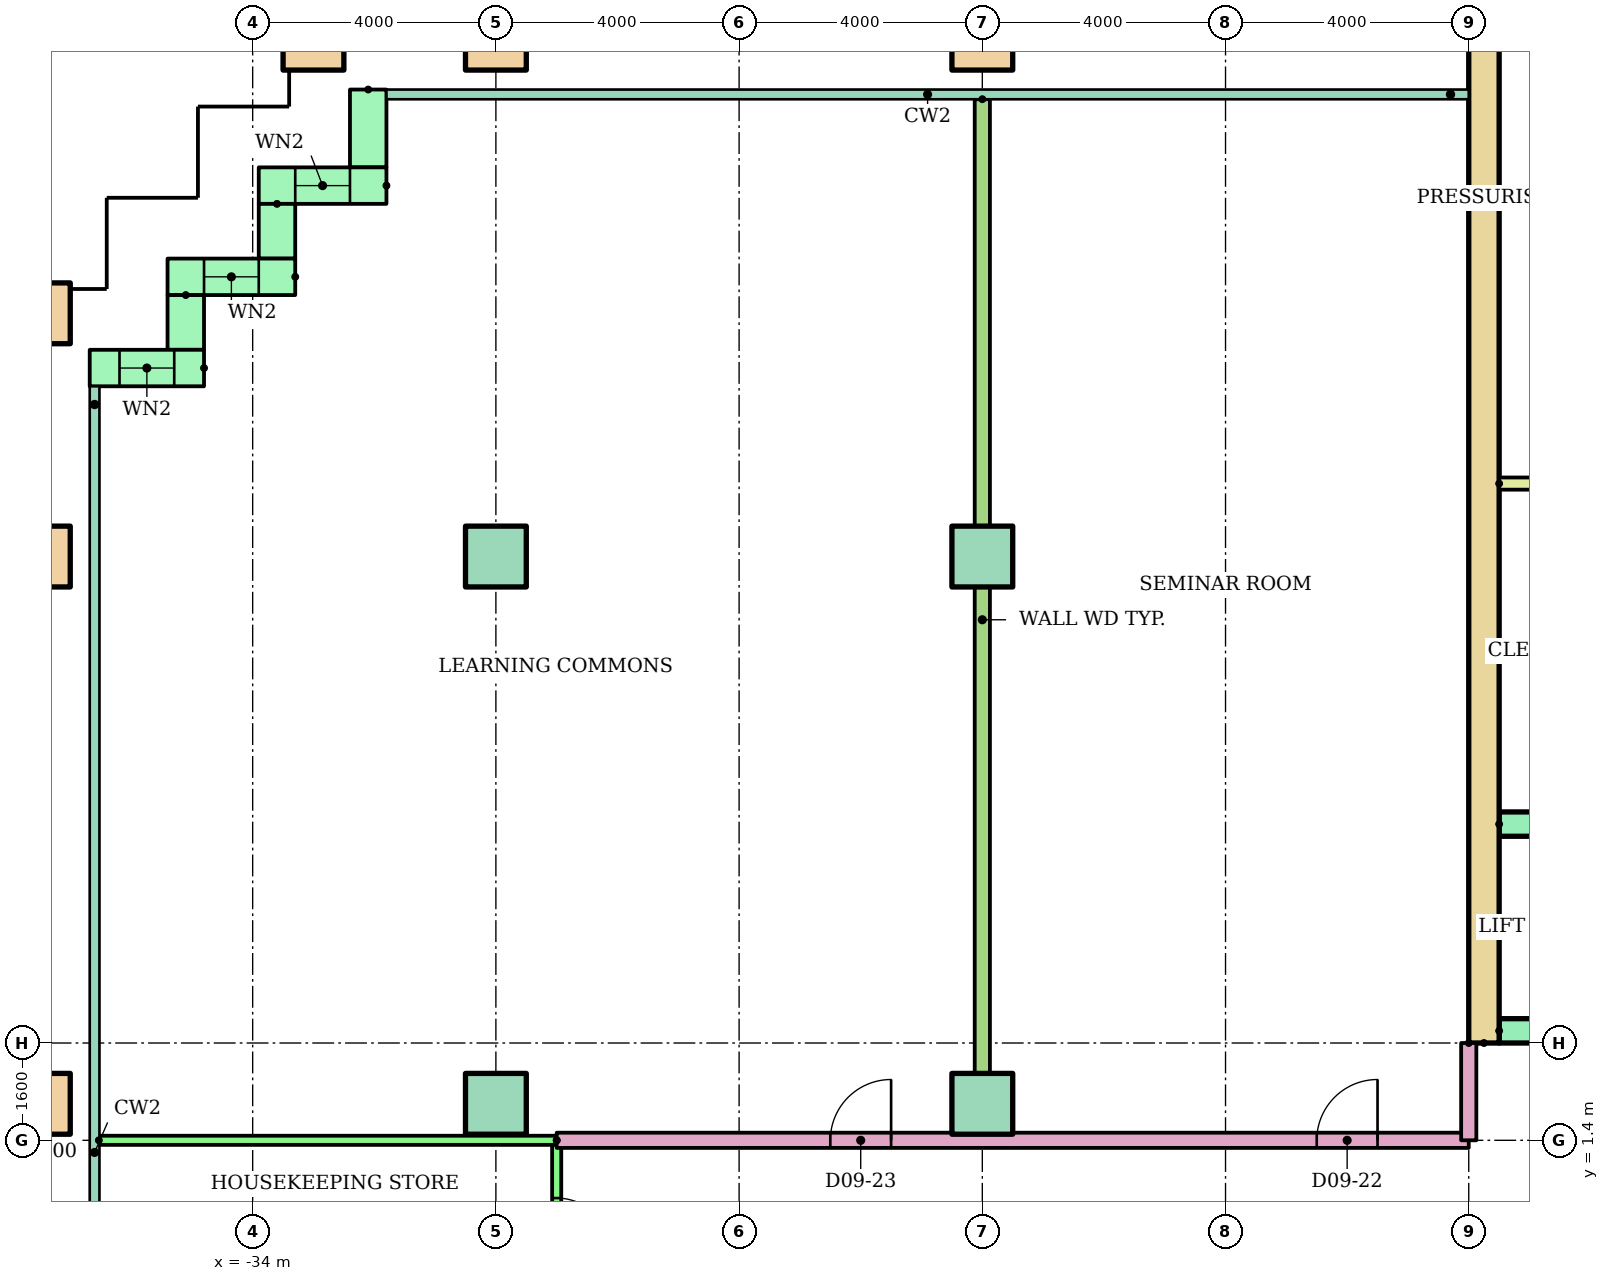
"""IFC4 building model, lengths in metres.
Left out: names, types, materials, properties, quantities, classifications, styles, units other than length and angle.
Written with IfcOpenShell. Run it as: python <this file> out.ifc"""

import sys

from ifc_helpers import new_model, si_unit, direction, frame, frame_2d, origin, origin_2d, place, context, subcontext, project, spatial, rectangle, hollow_rectangle, extrude, element, fill, save


model = new_model("IFC4")
c1 = context("Model", 3, precision=1e-05, world=origin(), true_north=direction((0.0, 1.0)))
c2 = subcontext(c1, "Body", "Model", "MODEL_VIEW")
j1 = project(units=[si_unit("LENGTHUNIT", "METRE"), si_unit("PLANEANGLEUNIT", "RADIAN")], contexts=[c1])
p1 = place(None, origin())
s1 = spatial("IfcSite", under=j1, at=p1, CompositionType="ELEMENT")
p2 = place(p1, origin())
s2 = spatial("IfcBuilding", under=s1, at=p2, CompositionType="ELEMENT")
p3 = place(p2, frame((0.0, 0.0, 37.7)))
s3 = spatial("IfcBuildingStorey", under=s2, at=p3, CompositionType="ELEMENT", Elevation=37.7)
p4 = place(p3, frame((-37.5, 2.0, 0.0)))
e1 = element("IfcColumn", 1, at=p4, inside=s3, PredefinedType="COLUMN", context=c2, shape_type="SweptSolid", body=[
    extrude(hollow_rectangle(XDim=1.0, YDim=1.0, WallThickness=0.05, at=origin_2d()), origin(), (0.0, 0.0, 1.0), 3.9),
])
for number, where in (
    (2, (-30.0, 2.0, 0.0)),
    (3, (-22.0, 2.0, 0.0)),
):
    element("IfcColumn", number, at=place(p3, frame(where)), inside=s3, PredefinedType="COLUMN", context=c2, shape_type="SweptSolid", body=[
        extrude(rectangle(XDim=1.0, YDim=1.0, at=origin_2d()), origin(), (0.0, 0.0, 1.0), 3.9),
    ])
p5 = place(p3, frame((-37.5, 11.0, 0.0)))
e4 = element("IfcColumn", 4, at=p5, inside=s3, PredefinedType="COLUMN", context=c2, shape_type="SweptSolid", body=[
    extrude(hollow_rectangle(XDim=1.0, YDim=1.0, WallThickness=0.05, at=origin_2d()), origin(), (0.0, 0.0, 1.0), 3.9),
])
for number, where in (
    (5, (-30.0, 11.0, 0.0)),
    (6, (-22.0, 11.0, 0.0)),
):
    element("IfcColumn", number, at=place(p3, frame(where)), inside=s3, PredefinedType="COLUMN", context=c2, shape_type="SweptSolid", body=[
        extrude(rectangle(XDim=1.0, YDim=1.0, at=origin_2d()), origin(), (0.0, 0.0, 1.0), 3.9),
    ])
for number, where in (
    (7, (-37.5, 15.0, 0.0)),
    (8, (-33.0, 19.5, 0.0)),
    (9, (-30.0, 19.5, 0.0)),
    (10, (-22.0, 19.5, 0.0)),
):
    element("IfcColumn", number, at=place(p3, frame(where)), inside=s3, PredefinedType="COLUMN", context=c2, shape_type="SweptSolid", body=[
        extrude(hollow_rectangle(XDim=1.0, YDim=1.0, WallThickness=0.05, at=origin_2d()), origin(), (0.0, 0.0, 1.0), 3.9),
    ])
p6 = place(p3, frame((-32.1, 18.68, 0.0), z_axis=(0.0, 0.0, 1.0), x_axis=(0.0, -1.0, 0.0)))
e11 = element("IfcWall", 11, at=p6, inside=s3, PredefinedType="STANDARD", context=c2, shape_type="SweptSolid", body=[
    extrude(rectangle(XDim=1.28, YDim=0.6, at=frame_2d((0.64, 0.0))), origin(), (0.0, 0.0, 1.0), 3.62),
])
p7 = place(p3, frame((-31.8, 17.1, 0.0), z_axis=(0.0, 0.0, 1.0), x_axis=(-1.0, 0.0, 0.0)))
e12 = element("IfcWall", 12, at=p7, inside=s3, PredefinedType="STANDARD", context=c2, shape_type="SweptSolid", body=[
    extrude(rectangle(XDim=2.1, YDim=0.6, at=frame_2d((1.05, 0.0))), origin(), (0.0, 0.0, 1.0), 3.62),
])
p8 = place(p7, frame((0.6, 0.0, 0.9)))
e13 = element("IfcOpeningElement", 13, at=p8, cuts=e12, PredefinedType="OPENING", context=c2, shape_type="SweptSolid", body=[
    extrude(rectangle(XDim=0.9, YDim=1.8, at=frame_2d((0.45, 0.9))), frame((0.0, 0.31, 0.0), z_axis=(0.0, -1.0, 0.0), x_axis=(1.0, 0.0, 0.0)), (0.0, 0.0, 1.0), 0.62),
])
p9 = place(p3, frame((-33.6, 16.8, 0.0), z_axis=(0.0, 0.0, 1.0), x_axis=(0.0, -1.0, 0.0)))
e14 = element("IfcWall", 14, at=p9, inside=s3, PredefinedType="STANDARD", context=c2, shape_type="SweptSolid", body=[
    extrude(rectangle(XDim=0.9, YDim=0.6, at=frame_2d((0.45, 0.0))), origin(), (0.0, 0.0, 1.0), 3.62),
])
p10 = place(p3, frame((-33.3, 15.6, 0.0), z_axis=(0.0, 0.0, 1.0), x_axis=(-1.0, 0.0, 0.0)))
e15 = element("IfcWall", 15, at=p10, inside=s3, PredefinedType="STANDARD", context=c2, shape_type="SweptSolid", body=[
    extrude(rectangle(XDim=2.1, YDim=0.6, at=frame_2d((1.05, 0.0))), origin(), (0.0, 0.0, 1.0), 3.62),
])
p11 = place(p10, frame((0.6, 0.0, 0.9)))
e16 = element("IfcOpeningElement", 16, at=p11, cuts=e15, PredefinedType="OPENING", context=c2, shape_type="SweptSolid", body=[
    extrude(rectangle(XDim=0.9, YDim=1.8, at=frame_2d((0.45, 0.9))), frame((0.0, 0.31, 0.0), z_axis=(0.0, -1.0, 0.0), x_axis=(1.0, 0.0, 0.0)), (0.0, 0.0, 1.0), 0.62),
])
p12 = place(p3, frame((-35.1, 15.3, 0.0), z_axis=(0.0, 0.0, 1.0), x_axis=(0.0, -1.0, 0.0)))
e17 = element("IfcWall", 17, at=p12, inside=s3, PredefinedType="STANDARD", context=c2, shape_type="SweptSolid", body=[
    extrude(rectangle(XDim=0.9, YDim=0.6, at=frame_2d((0.45, 0.0))), origin(), (0.0, 0.0, 1.0), 3.62),
])
p13 = place(p3, frame((-34.8, 14.1, 0.0), z_axis=(0.0, 0.0, 1.0), x_axis=(-1.0, 0.0, 0.0)))
e18 = element("IfcWall", 18, at=p13, inside=s3, PredefinedType="STANDARD", context=c2, shape_type="SweptSolid", body=[
    extrude(rectangle(XDim=1.88, YDim=0.6, at=frame_2d((0.94, 0.0))), origin(), (0.0, 0.0, 1.0), 3.62),
])
p14 = place(p13, frame((0.49, 0.0, 0.9)))
e19 = element("IfcOpeningElement", 19, at=p14, cuts=e18, PredefinedType="OPENING", context=c2, shape_type="SweptSolid", body=[
    extrude(rectangle(XDim=0.9, YDim=1.8, at=frame_2d((0.45, 0.9))), frame((0.0, 0.31, 0.0), z_axis=(0.0, -1.0, 0.0), x_axis=(1.0, 0.0, 0.0)), (0.0, 0.0, 1.0), 0.62),
])
p15 = place(p3, frame((-13.75, 3.0, 0.0), z_axis=(0.0, 0.0, 1.0), x_axis=(0.0, 1.0, 0.0)))
e20 = element("IfcWall", 20, at=p15, inside=s3, PredefinedType="SHEAR", context=c2, shape_type="SweptSolid", body=[
    extrude(rectangle(XDim=17.0, YDim=0.5, at=frame_2d((8.5, 0.0))), origin(), (0.0, 0.0, 1.0), 3.62),
])
p16 = place(p3, frame((-13.5, 3.2, 0.0)))
e21 = element("IfcWall", 21, at=p16, inside=s3, PredefinedType="SHEAR", context=c2, shape_type="SweptSolid", body=[
    extrude(rectangle(XDim=27.0, YDim=0.4, at=frame_2d((13.5, 0.0))), origin(), (0.0, 0.0, 1.0), 3.62),
])
p17 = place(p16, frame((6.861, 0.0, 0.0)))
e22 = element("IfcOpeningElement", 22, at=p17, cuts=e21, PredefinedType="OPENING", context=c2, shape_type="SweptSolid", body=[
    extrude(rectangle(XDim=1.1, YDim=2.1, at=frame_2d((0.55, 1.05))), frame((0.0, 0.21, 0.0), z_axis=(0.0, -1.0, 0.0), x_axis=(1.0, 0.0, 0.0)), (0.0, 0.0, 1.0), 0.42),
])
p18 = place(p16, frame((9.906, 0.0, 0.0)))
e23 = element("IfcOpeningElement", 23, at=p18, cuts=e21, PredefinedType="OPENING", context=c2, shape_type="SweptSolid", body=[
    extrude(rectangle(XDim=1.1, YDim=2.1, at=frame_2d((0.55, 1.05))), frame((0.0, 0.21, 0.0), z_axis=(0.0, -1.0, 0.0), x_axis=(1.0, 0.0, 0.0)), (0.0, 0.0, 1.0), 0.42),
])
p19 = place(p16, frame((15.994, 0.0, 0.0)))
e24 = element("IfcOpeningElement", 24, at=p19, cuts=e21, PredefinedType="OPENING", context=c2, shape_type="SweptSolid", body=[
    extrude(rectangle(XDim=1.1, YDim=2.1, at=frame_2d((0.55, 1.05))), frame((0.0, 0.21, 0.0), z_axis=(0.0, -1.0, 0.0), x_axis=(1.0, 0.0, 0.0)), (0.0, 0.0, 1.0), 0.42),
])
p20 = place(p16, frame((19.039, 0.0, 0.0)))
e25 = element("IfcOpeningElement", 25, at=p20, cuts=e21, PredefinedType="OPENING", context=c2, shape_type="SweptSolid", body=[
    extrude(rectangle(XDim=1.1, YDim=2.1, at=frame_2d((0.55, 1.05))), frame((0.0, 0.21, 0.0), z_axis=(0.0, -1.0, 0.0), x_axis=(1.0, 0.0, 0.0)), (0.0, 0.0, 1.0), 0.42),
])
p21 = place(p16, frame((12.6, 0.0, 0.0)))
e26 = element("IfcOpeningElement", 26, at=p21, cuts=e21, PredefinedType="OPENING", context=c2, shape_type="SweptSolid", body=[
    extrude(rectangle(XDim=1.8, YDim=2.1, at=frame_2d((0.9, 1.05))), frame((0.0, 0.21, 0.0), z_axis=(0.0, -1.0, 0.0), x_axis=(1.0, 0.0, 0.0)), (0.0, 0.0, 1.0), 0.42),
])
p22 = place(p3, frame((-13.5, 6.6, 0.0)))
e27 = element("IfcWall", 27, at=p22, inside=s3, PredefinedType="SHEAR", context=c2, shape_type="SweptSolid", body=[
    extrude(rectangle(XDim=11.978, YDim=0.4, at=frame_2d((5.989, 0.0))), origin(), (0.0, 0.0, 1.0), 3.62),
])
p23 = place(p3, frame((-13.5, 12.2, 0.0)))
e28 = element("IfcWall", 28, at=p23, inside=s3, PredefinedType="PARTITIONING", context=c2, shape_type="SweptSolid", body=[
    extrude(rectangle(XDim=3.9, YDim=0.2, at=frame_2d((1.95, 0.0))), origin(), (0.0, 0.0, 1.0), 3.62),
])
p24 = place(p3, frame((-29.0, 1.4, 0.0), z_axis=(0.0, 0.0, 1.0), x_axis=(0.0, -1.0, 0.0)))
e29 = element("IfcWall", 29, at=p24, inside=s3, PredefinedType="PARTITIONING", context=c2, shape_type="SweptSolid", body=[
    extrude(rectangle(XDim=2.8, YDim=0.15, at=frame_2d((1.4, 0.0))), origin(), (0.0, 0.0, 1.0), 3.1),
])
p25 = place(p24, frame((0.95, 0.0, 0.0)))
e30 = element("IfcOpeningElement", 30, at=p25, cuts=e29, PredefinedType="OPENING", context=c2, shape_type="SweptSolid", body=[
    extrude(rectangle(XDim=0.9, YDim=2.1, at=frame_2d((0.45, 1.05))), frame((0.0, 0.085, 0.0), z_axis=(0.0, -1.0, 0.0), x_axis=(1.0, 0.0, 0.0)), (0.0, 0.0, 1.0), 0.17),
])
p26 = place(p3, frame((-29.0, 1.4, 0.0)))
e31 = element("IfcWall", 31, at=p26, inside=s3, PredefinedType="PARTITIONING", context=c2, shape_type="SweptSolid", body=[
    extrude(rectangle(XDim=15.0, YDim=0.25, at=frame_2d((7.5, 0.0))), origin(), (0.0, 0.0, 1.0), 3.1),
])
p27 = place(p26, frame((12.5, 0.0, 0.0)))
e32 = element("IfcOpeningElement", 32, at=p27, cuts=e31, PredefinedType="OPENING", context=c2, shape_type="SweptSolid", body=[
    extrude(rectangle(XDim=1.0, YDim=2.1, at=frame_2d((0.5, 1.05))), frame((0.0, 0.135, 0.0), z_axis=(0.0, -1.0, 0.0), x_axis=(1.0, 0.0, 0.0)), (0.0, 0.0, 1.0), 0.27),
])
p28 = place(p26, frame((4.5, 0.0, 0.0)))
e33 = element("IfcOpeningElement", 33, at=p28, cuts=e31, PredefinedType="OPENING", context=c2, shape_type="SweptSolid", body=[
    extrude(rectangle(XDim=1.0, YDim=2.1, at=frame_2d((0.5, 1.05))), frame((0.0, 0.135, 0.0), z_axis=(0.0, -1.0, 0.0), x_axis=(1.0, 0.0, 0.0)), (0.0, 0.0, 1.0), 0.27),
])
p29 = place(p3, frame((-36.53, 1.4, 0.0)))
e34 = element("IfcWall", 34, at=p29, inside=s3, PredefinedType="PARTITIONING", context=c2, shape_type="SweptSolid", body=[
    extrude(rectangle(XDim=7.53, YDim=0.15, at=frame_2d((3.765, 0.0))), origin(), (0.0, 0.0, 1.0), 3.1),
])
p30 = place(p3, frame((-22.0, 18.521, 0.0), z_axis=(0.0, 0.0, 1.0), x_axis=(0.0, -1.0, 0.0)))
e35 = element("IfcWall", 35, at=p30, inside=s3, PredefinedType="PARTITIONING", context=c2, shape_type="SweptSolid", body=[
    extrude(rectangle(XDim=17.121, YDim=0.25, at=frame_2d((8.561, 0.0))), origin(), (0.0, 0.0, 1.0), 3.1),
])
p31 = place(p3, frame((-14.0, 3.0, 0.0), z_axis=(0.0, 0.0, 1.0), x_axis=(0.0, -1.0, 0.0)))
e36 = element("IfcWall", 36, at=p31, inside=s3, PredefinedType="PARTITIONING", context=c2, shape_type="SweptSolid", body=[
    extrude(rectangle(XDim=1.6, YDim=0.25, at=frame_2d((0.8, 0.0))), origin(), (0.0, 0.0, 1.0), 3.1),
])
p32 = place(p8, origin())
e37 = element("IfcWindow", 37, at=p32, inside=s3, PartitioningType="SINGLE_PANEL", PredefinedType="WINDOW", context=c2, shape_type="SweptSolid", body=[
    extrude(rectangle(XDim=0.9, YDim=1.8, at=frame_2d((0.45, 0.9))), frame((0.0, 0.03, 0.0), z_axis=(0.0, -1.0, 0.0), x_axis=(1.0, 0.0, 0.0)), (0.0, 0.0, 1.0), 0.06),
])
fill(e13, e37)
p33 = place(p11, origin())
e38 = element("IfcWindow", 38, at=p33, inside=s3, PartitioningType="SINGLE_PANEL", PredefinedType="WINDOW", context=c2, shape_type="SweptSolid", body=[
    extrude(rectangle(XDim=0.9, YDim=1.8, at=frame_2d((0.45, 0.9))), frame((0.0, 0.03, 0.0), z_axis=(0.0, -1.0, 0.0), x_axis=(1.0, 0.0, 0.0)), (0.0, 0.0, 1.0), 0.06),
])
fill(e16, e38)
p34 = place(p14, origin())
e39 = element("IfcWindow", 39, at=p34, inside=s3, PartitioningType="SINGLE_PANEL", PredefinedType="WINDOW", context=c2, shape_type="SweptSolid", body=[
    extrude(rectangle(XDim=0.9, YDim=1.8, at=frame_2d((0.45, 0.9))), frame((0.0, 0.03, 0.0), z_axis=(0.0, -1.0, 0.0), x_axis=(1.0, 0.0, 0.0)), (0.0, 0.0, 1.0), 0.06),
])
fill(e19, e39)
p35 = place(p25, origin())
e40 = element("IfcDoor", 40, at=p35, inside=s3, OperationType="SINGLE_SWING_RIGHT", PredefinedType="DOOR", context=c2, shape_type="SweptSolid", body=[
    extrude(rectangle(XDim=0.9, YDim=2.1, at=frame_2d((0.45, 1.05))), frame((0.0, 0.025, 0.0), z_axis=(0.0, -1.0, 0.0), x_axis=(1.0, 0.0, 0.0)), (0.0, 0.0, 1.0), 0.05),
])
fill(e30, e40)
p36 = place(p27, origin())
e41 = element("IfcDoor", 41, at=p36, inside=s3, OperationType="SINGLE_SWING_RIGHT", PredefinedType="DOOR", context=c2, shape_type="SweptSolid", body=[
    extrude(rectangle(XDim=1.0, YDim=2.1, at=frame_2d((0.5, 1.05))), frame((0.0, 0.025, 0.0), z_axis=(0.0, -1.0, 0.0), x_axis=(1.0, 0.0, 0.0)), (0.0, 0.0, 1.0), 0.05),
])
fill(e32, e41)
p37 = place(p28, origin())
e42 = element("IfcDoor", 42, at=p37, inside=s3, OperationType="SINGLE_SWING_RIGHT", PredefinedType="DOOR", context=c2, shape_type="SweptSolid", body=[
    extrude(rectangle(XDim=1.0, YDim=2.1, at=frame_2d((0.5, 1.05))), frame((0.0, 0.025, 0.0), z_axis=(0.0, -1.0, 0.0), x_axis=(1.0, 0.0, 0.0)), (0.0, 0.0, 1.0), 0.05),
])
fill(e33, e42)
save(model, sys.argv[1])
